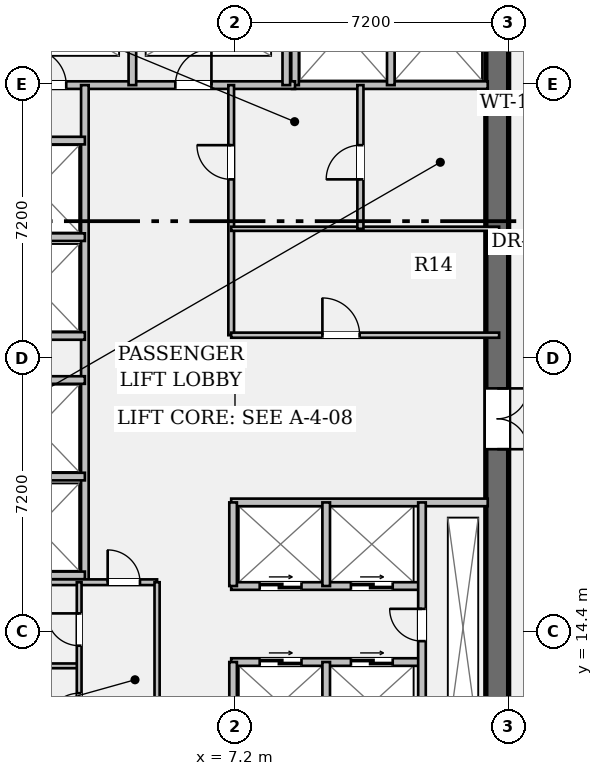
"""IFC4 building model, lengths in metres.
Left out: names, types, materials, properties, quantities, classifications, styles, units other than length and angle.
Written with IfcOpenShell. Run it as: python <this file> out.ifc"""

import sys

from ifc_helpers import new_model, si_unit, direction, frame, frame_2d, origin, place, context, subcontext, project, spatial, rectangle, extrude, element, fill, save


model = new_model("IFC4")
c1 = context("Model", 3, precision=1e-05, world=origin(), true_north=direction((0.0, 1.0)))
c2 = subcontext(c1, "Body", "Model", "MODEL_VIEW")
j1 = project(units=[si_unit("LENGTHUNIT", "METRE"), si_unit("PLANEANGLEUNIT", "RADIAN")], contexts=[c1])
p1 = place(None, origin())
s1 = spatial("IfcSite", under=j1, at=p1, CompositionType="ELEMENT")
p2 = place(p1, origin())
s2 = spatial("IfcBuilding", under=s1, at=p2, CompositionType="ELEMENT")
p3 = place(p2, frame((0.0, 0.0, 129.15)))
s3 = spatial("IfcBuildingStorey", under=s2, at=p3, CompositionType="ELEMENT", Elevation=129.15)
p4 = place(p3, frame((14.1, 35.4, 0.0), z_axis=(0.0, 0.0, 1.0), x_axis=(0.0, -1.0, 0.0)))
e1 = element("IfcWall", 1, at=p4, inside=s3, PredefinedType="SHEAR", context=c2, shape_type="SweptSolid", body=[
    extrude(rectangle(XDim=27.6, YDim=0.6, at=frame_2d((13.8, 0.0))), origin(), (0.0, 0.0, 1.0), 3.58),
])
p5 = place(p4, frame((1.3, 0.0, 0.0)))
e2 = element("IfcOpeningElement", 2, at=p5, cuts=e1, PredefinedType="OPENING", context=c2, shape_type="SweptSolid", body=[
    extrude(rectangle(XDim=1.2, YDim=2.15, at=frame_2d((0.6, 1.075))), frame((0.0, 0.312, 0.0), z_axis=(0.0, -1.0, 0.0), x_axis=(1.0, 0.0, 0.0)), (0.0, 0.0, 1.0), 0.624),
])
p6 = place(p4, frame((25.25, 0.0, 0.0)))
e3 = element("IfcOpeningElement", 3, at=p6, cuts=e1, PredefinedType="OPENING", context=c2, shape_type="SweptSolid", body=[
    extrude(rectangle(XDim=1.2, YDim=2.15, at=frame_2d((0.6, 1.075))), frame((0.0, 0.312, 0.0), z_axis=(0.0, -1.0, 0.0), x_axis=(1.0, 0.0, 0.0)), (0.0, 0.0, 1.0), 0.624),
])
p7 = place(p4, frame((14.6, 0.0, 0.0)))
e4 = element("IfcOpeningElement", 4, at=p7, cuts=e1, PredefinedType="OPENING", context=c2, shape_type="SweptSolid", body=[
    extrude(rectangle(XDim=1.6, YDim=2.2, at=frame_2d((0.8, 1.1))), frame((0.0, 0.312, 0.0), z_axis=(0.0, -1.0, 0.0), x_axis=(1.0, 0.0, 0.0)), (0.0, 0.0, 1.0), 0.624),
])
p8 = place(p3, frame((8.7, 28.78, 0.0), z_axis=(0.0, 0.0, 1.0), x_axis=(1.0, 0.0, 0.0)))
e5 = element("IfcWall", 5, at=p8, inside=s3, PredefinedType="PARTITIONING", context=c2, shape_type="SweptSolid", body=[
    extrude(rectangle(XDim=5.15, YDim=0.2, at=frame_2d((2.575, 0.0))), origin(), (0.0, 0.0, 1.0), 3.58),
])
for number, where, z_axis, x_axis in (
    (6, (8.78, 28.78, 0.0), (0.0, 0.0, 1.0), (0.0, 1.0, 0.0)),
    (7, (11.3, 28.78, 0.0), (0.0, 0.0, 1.0), (0.0, 1.0, 0.0)),
):
    element("IfcWall", number, at=place(p3, frame(where, z_axis=z_axis, x_axis=x_axis)), inside=s3, PredefinedType="PARTITIONING", context=c2, shape_type="SweptSolid", body=[
        extrude(rectangle(XDim=3.1, YDim=0.2, at=frame_2d((1.55, 0.0))), origin(), (0.0, 0.0, 1.0), 3.58),
    ])
p9 = place(p3, frame((0.6, 28.78, 0.0), z_axis=(0.0, 0.0, 1.0), x_axis=(1.0, 0.0, 0.0)))
e8 = element("IfcWall", 8, at=p9, inside=s3, PredefinedType="PARTITIONING", context=c2, shape_type="SweptSolid", body=[
    extrude(rectangle(XDim=8.18, YDim=0.2, at=frame_2d((4.09, 0.0))), origin(), (0.0, 0.0, 1.0), 3.58),
])
p10 = place(p9, frame((1.21, 0.0, 0.0)))
e9 = element("IfcOpeningElement", 9, at=p10, cuts=e8, PredefinedType="OPENING", context=c2, shape_type="SweptSolid", body=[
    extrude(rectangle(XDim=0.95, YDim=2.15, at=frame_2d((0.475, 1.075))), frame((0.0, 0.112, 0.0), z_axis=(0.0, -1.0, 0.0), x_axis=(1.0, 0.0, 0.0)), (0.0, 0.0, 1.0), 0.224),
])
p11 = place(p9, frame((5.03, 0.0, 0.0)))
e10 = element("IfcOpeningElement", 10, at=p11, cuts=e8, PredefinedType="OPENING", context=c2, shape_type="SweptSolid", body=[
    extrude(rectangle(XDim=0.95, YDim=2.15, at=frame_2d((0.475, 1.075))), frame((0.0, 0.112, 0.0), z_axis=(0.0, -1.0, 0.0), x_axis=(1.0, 0.0, 0.0)), (0.0, 0.0, 1.0), 0.224),
])
for number, where, z_axis, x_axis in (
    (11, (4.5, 28.78, 0.0), (0.0, 0.0, 1.0), (0.0, 1.0, 0.0)),
    (12, (8.55, 28.78, 0.0), (0.0, 0.0, 1.0), (0.0, 1.0, 0.0)),
):
    element("IfcWall", number, at=place(p3, frame(where, z_axis=z_axis, x_axis=x_axis)), inside=s3, PredefinedType="PARTITIONING", context=c2, shape_type="SweptSolid", body=[
        extrude(rectangle(XDim=2.94, YDim=0.2, at=frame_2d((1.47, 0.0))), origin(), (0.0, 0.0, 1.0), 3.58),
    ])
p12 = place(p3, frame((3.25, 15.7, 0.0), z_axis=(0.0, 0.0, 1.0), x_axis=(0.0, 1.0, 0.0)))
e13 = element("IfcWall", 13, at=p12, inside=s3, PredefinedType="PARTITIONING", context=c2, shape_type="SweptSolid", body=[
    extrude(rectangle(XDim=13.08, YDim=0.2, at=frame_2d((6.54, 0.0))), origin(), (0.0, 0.0, 1.0), 3.58),
])
for number, where, z_axis, x_axis in (
    (14, (0.6, 15.88, 0.0), (0.0, 0.0, 1.0), (1.0, 0.0, 0.0)),
    (15, (0.6, 18.48, 0.0), (0.0, 0.0, 1.0), (1.0, 0.0, 0.0)),
    (16, (0.6, 22.18, 0.0), (0.0, 0.0, 1.0), (1.0, 0.0, 0.0)),
    (17, (0.6, 24.78, 0.0), (0.0, 0.0, 1.0), (1.0, 0.0, 0.0)),
    (18, (0.6, 21.02, 0.0), (0.0, 0.0, 1.0), (1.0, 0.0, 0.0)),
    (19, (0.6, 27.32, 0.0), (0.0, 0.0, 1.0), (1.0, 0.0, 0.0)),
):
    element("IfcWall", number, at=place(p3, frame(where, z_axis=z_axis, x_axis=x_axis)), inside=s3, PredefinedType="PARTITIONING", context=c2, shape_type="SweptSolid", body=[
        extrude(rectangle(XDim=2.65, YDim=0.2, at=frame_2d((1.325, 0.0))), origin(), (0.0, 0.0, 1.0), 3.58),
    ])
p13 = place(p3, frame((7.1, 22.2, 0.0), z_axis=(0.0, 0.0, 1.0), x_axis=(0.0, 1.0, 0.0)))
e20 = element("IfcWall", 20, at=p13, inside=s3, PredefinedType="PARTITIONING", context=c2, shape_type="SweptSolid", body=[
    extrude(rectangle(XDim=6.58, YDim=0.15, at=frame_2d((3.29, 0.0))), origin(), (0.0, 0.0, 1.0), 3.58),
])
p14 = place(p13, frame((4.1, 0.0, 0.0)))
e21 = element("IfcOpeningElement", 21, at=p14, cuts=e20, PredefinedType="OPENING", context=c2, shape_type="SweptSolid", body=[
    extrude(rectangle(XDim=0.9, YDim=2.15, at=frame_2d((0.45, 1.075))), frame((0.0, 0.087, 0.0), z_axis=(0.0, -1.0, 0.0), x_axis=(1.0, 0.0, 0.0)), (0.0, 0.0, 1.0), 0.174),
])
p15 = place(p3, frame((7.1, 22.2, 0.0), z_axis=(0.0, 0.0, 1.0), x_axis=(1.0, 0.0, 0.0)))
e22 = element("IfcWall", 22, at=p15, inside=s3, PredefinedType="PARTITIONING", context=c2, shape_type="SweptSolid", body=[
    extrude(rectangle(XDim=7.05, YDim=0.135, at=frame_2d((3.525, 0.0))), origin(), (0.0, 0.0, 1.0), 3.58),
])
p16 = place(p15, frame((2.4, 0.0, 0.0)))
e23 = element("IfcOpeningElement", 23, at=p16, cuts=e22, PredefinedType="OPENING", context=c2, shape_type="SweptSolid", body=[
    extrude(rectangle(XDim=0.98, YDim=2.15, at=frame_2d((0.49, 1.075))), frame((0.0, 0.08, 0.0), z_axis=(0.0, -1.0, 0.0), x_axis=(1.0, 0.0, 0.0)), (0.0, 0.0, 1.0), 0.159),
])
p17 = place(p3, frame((7.1, 25.0, 0.0), z_axis=(0.0, 0.0, 1.0), x_axis=(1.0, 0.0, 0.0)))
e24 = element("IfcWall", 24, at=p17, inside=s3, PredefinedType="PARTITIONING", context=c2, shape_type="SweptSolid", body=[
    extrude(rectangle(XDim=7.05, YDim=0.11, at=frame_2d((3.525, 0.0))), origin(), (0.0, 0.0, 1.0), 3.58),
])
p18 = place(p3, frame((10.5, 25.0, 0.0), z_axis=(0.0, 0.0, 1.0), x_axis=(0.0, 1.0, 0.0)))
e25 = element("IfcWall", 25, at=p18, inside=s3, PredefinedType="PARTITIONING", context=c2, shape_type="SweptSolid", body=[
    extrude(rectangle(XDim=3.78, YDim=0.16, at=frame_2d((1.89, 0.0))), origin(), (0.0, 0.0, 1.0), 3.58),
])
p19 = place(p18, frame((1.3, 0.0, 0.0)))
e26 = element("IfcOpeningElement", 26, at=p19, cuts=e25, PredefinedType="OPENING", context=c2, shape_type="SweptSolid", body=[
    extrude(rectangle(XDim=0.9, YDim=2.15, at=frame_2d((0.45, 1.075))), frame((0.0, 0.092, 0.0), z_axis=(0.0, -1.0, 0.0), x_axis=(1.0, 0.0, 0.0)), (0.0, 0.0, 1.0), 0.184),
])
p20 = place(p3, frame((7.1, 17.8, 0.0), z_axis=(0.0, 0.0, 1.0), x_axis=(1.0, 0.0, 0.0)))
e27 = element("IfcWall", 27, at=p20, inside=s3, PredefinedType="PARTITIONING", context=c2, shape_type="SweptSolid", body=[
    extrude(rectangle(XDim=6.75, YDim=0.2, at=frame_2d((3.375, 0.0))), origin(), (0.0, 0.0, 1.0), 3.58),
])
p21 = place(p3, frame((7.1, 15.6, 0.0), z_axis=(0.0, 0.0, 1.0), x_axis=(1.0, 0.0, 0.0)))
e28 = element("IfcWall", 28, at=p21, inside=s3, PredefinedType="PARTITIONING", context=c2, shape_type="SweptSolid", body=[
    extrude(rectangle(XDim=5.02, YDim=0.2, at=frame_2d((2.51, 0.0))), origin(), (0.0, 0.0, 1.0), 3.58),
])
p22 = place(p21, frame((0.75, 0.0, 0.0)))
e29 = element("IfcOpeningElement", 29, at=p22, cuts=e28, PredefinedType="OPENING", context=c2, shape_type="SweptSolid", body=[
    extrude(rectangle(XDim=1.1, YDim=2.2, at=frame_2d((0.55, 1.1))), frame((0.0, 0.112, 0.0), z_axis=(0.0, -1.0, 0.0), x_axis=(1.0, 0.0, 0.0)), (0.0, 0.0, 1.0), 0.224),
])
p23 = place(p21, frame((3.15, 0.0, 0.0)))
e30 = element("IfcOpeningElement", 30, at=p23, cuts=e28, PredefinedType="OPENING", context=c2, shape_type="SweptSolid", body=[
    extrude(rectangle(XDim=1.1, YDim=2.2, at=frame_2d((0.55, 1.1))), frame((0.0, 0.112, 0.0), z_axis=(0.0, -1.0, 0.0), x_axis=(1.0, 0.0, 0.0)), (0.0, 0.0, 1.0), 0.224),
])
p24 = place(p3, frame((7.1, 13.6, 0.0), z_axis=(0.0, 0.0, 1.0), x_axis=(1.0, 0.0, 0.0)))
e31 = element("IfcWall", 31, at=p24, inside=s3, PredefinedType="PARTITIONING", context=c2, shape_type="SweptSolid", body=[
    extrude(rectangle(XDim=5.02, YDim=0.2, at=frame_2d((2.51, 0.0))), origin(), (0.0, 0.0, 1.0), 3.58),
])
p25 = place(p24, frame((0.75, 0.0, 0.0)))
e32 = element("IfcOpeningElement", 32, at=p25, cuts=e31, PredefinedType="OPENING", context=c2, shape_type="SweptSolid", body=[
    extrude(rectangle(XDim=1.1, YDim=2.2, at=frame_2d((0.55, 1.1))), frame((0.0, 0.112, 0.0), z_axis=(0.0, -1.0, 0.0), x_axis=(1.0, 0.0, 0.0)), (0.0, 0.0, 1.0), 0.224),
])
p26 = place(p24, frame((3.15, 0.0, 0.0)))
e33 = element("IfcOpeningElement", 33, at=p26, cuts=e31, PredefinedType="OPENING", context=c2, shape_type="SweptSolid", body=[
    extrude(rectangle(XDim=1.1, YDim=2.2, at=frame_2d((0.55, 1.1))), frame((0.0, 0.112, 0.0), z_axis=(0.0, -1.0, 0.0), x_axis=(1.0, 0.0, 0.0)), (0.0, 0.0, 1.0), 0.224),
])
p27 = place(p3, frame((7.15, 15.6, 0.0), z_axis=(0.0, 0.0, 1.0), x_axis=(0.0, 1.0, 0.0)))
e34 = element("IfcWall", 34, at=p27, inside=s3, PredefinedType="PARTITIONING", context=c2, shape_type="SweptSolid", body=[
    extrude(rectangle(XDim=2.2, YDim=0.2, at=frame_2d((1.1, 0.0))), origin(), (0.0, 0.0, 1.0), 3.58),
])
p28 = place(p3, frame((7.15, 11.2, 0.0), z_axis=(0.0, 0.0, 1.0), x_axis=(0.0, 1.0, 0.0)))
e35 = element("IfcWall", 35, at=p28, inside=s3, PredefinedType="PARTITIONING", context=c2, shape_type="SweptSolid", body=[
    extrude(rectangle(XDim=2.4, YDim=0.2, at=frame_2d((1.2, 0.0))), origin(), (0.0, 0.0, 1.0), 3.58),
])
p29 = place(p3, frame((9.6, 15.6, 0.0), z_axis=(0.0, 0.0, 1.0), x_axis=(0.0, 1.0, 0.0)))
e36 = element("IfcWall", 36, at=p29, inside=s3, PredefinedType="PARTITIONING", context=c2, shape_type="SweptSolid", body=[
    extrude(rectangle(XDim=2.2, YDim=0.2, at=frame_2d((1.1, 0.0))), origin(), (0.0, 0.0, 1.0), 3.58),
])
p30 = place(p3, frame((9.6, 11.2, 0.0), z_axis=(0.0, 0.0, 1.0), x_axis=(0.0, 1.0, 0.0)))
e37 = element("IfcWall", 37, at=p30, inside=s3, PredefinedType="PARTITIONING", context=c2, shape_type="SweptSolid", body=[
    extrude(rectangle(XDim=2.4, YDim=0.2, at=frame_2d((1.2, 0.0))), origin(), (0.0, 0.0, 1.0), 3.58),
])
p31 = place(p3, frame((12.12, 11.2, 0.0), z_axis=(0.0, 0.0, 1.0), x_axis=(0.0, 1.0, 0.0)))
e38 = element("IfcWall", 38, at=p31, inside=s3, PredefinedType="PARTITIONING", context=c2, shape_type="SweptSolid", body=[
    extrude(rectangle(XDim=6.6, YDim=0.2, at=frame_2d((3.3, 0.0))), origin(), (0.0, 0.0, 1.0), 3.58),
])
p32 = place(p31, frame((2.95, 0.0, 0.0)))
e39 = element("IfcOpeningElement", 39, at=p32, cuts=e38, PredefinedType="OPENING", context=c2, shape_type="SweptSolid", body=[
    extrude(rectangle(XDim=0.85, YDim=2.15, at=frame_2d((0.425, 1.075))), frame((0.0, 0.112, 0.0), z_axis=(0.0, -1.0, 0.0), x_axis=(1.0, 0.0, 0.0)), (0.0, 0.0, 1.0), 0.224),
])
p33 = place(p3, frame((0.6, 15.7, 0.0), z_axis=(0.0, 0.0, 1.0), x_axis=(1.0, 0.0, 0.0)))
e40 = element("IfcWall", 40, at=p33, inside=s3, PredefinedType="PARTITIONING", context=c2, shape_type="SweptSolid", body=[
    extrude(rectangle(XDim=4.55, YDim=0.15, at=frame_2d((2.275, 0.0))), origin(), (0.0, 0.0, 1.0), 3.58),
])
p34 = place(p33, frame((3.25, 0.0, 0.0)))
e41 = element("IfcOpeningElement", 41, at=p34, cuts=e40, PredefinedType="OPENING", context=c2, shape_type="SweptSolid", body=[
    extrude(rectangle(XDim=0.85, YDim=2.15, at=frame_2d((0.425, 1.075))), frame((0.0, 0.087, 0.0), z_axis=(0.0, -1.0, 0.0), x_axis=(1.0, 0.0, 0.0)), (0.0, 0.0, 1.0), 0.174),
])
p35 = place(p3, frame((5.15, 11.28, 0.0), z_axis=(0.0, 0.0, 1.0), x_axis=(0.0, 1.0, 0.0)))
e42 = element("IfcWall", 42, at=p35, inside=s3, PredefinedType="PARTITIONING", context=c2, shape_type="SweptSolid", body=[
    extrude(rectangle(XDim=4.42, YDim=0.135, at=frame_2d((2.21, 0.0))), origin(), (0.0, 0.0, 1.0), 3.58),
])
p36 = place(p3, frame((0.6, 13.5, 0.0), z_axis=(0.0, 0.0, 1.0), x_axis=(1.0, 0.0, 0.0)))
e43 = element("IfcWall", 43, at=p36, inside=s3, PredefinedType="PARTITIONING", context=c2, shape_type="SweptSolid", body=[
    extrude(rectangle(XDim=2.5, YDim=0.125, at=frame_2d((1.25, 0.0))), origin(), (0.0, 0.0, 1.0), 3.58),
])
p37 = place(p3, frame((3.1, 11.28, 0.0), z_axis=(0.0, 0.0, 1.0), x_axis=(0.0, 1.0, 0.0)))
e44 = element("IfcWall", 44, at=p37, inside=s3, PredefinedType="PARTITIONING", context=c2, shape_type="SweptSolid", body=[
    extrude(rectangle(XDim=4.42, YDim=0.125, at=frame_2d((2.21, 0.0))), origin(), (0.0, 0.0, 1.0), 3.58),
])
p38 = place(p37, frame((0.65, 0.0, 0.0)))
e45 = element("IfcOpeningElement", 45, at=p38, cuts=e44, PredefinedType="OPENING", context=c2, shape_type="SweptSolid", body=[
    extrude(rectangle(XDim=0.85, YDim=2.15, at=frame_2d((0.425, 1.075))), frame((0.0, 0.074, 0.0), z_axis=(0.0, -1.0, 0.0), x_axis=(1.0, 0.0, 0.0)), (0.0, 0.0, 1.0), 0.149),
])
p39 = place(p37, frame((2.75, 0.0, 0.0)))
e46 = element("IfcOpeningElement", 46, at=p39, cuts=e44, PredefinedType="OPENING", context=c2, shape_type="SweptSolid", body=[
    extrude(rectangle(XDim=0.85, YDim=2.15, at=frame_2d((0.425, 1.075))), frame((0.0, 0.074, 0.0), z_axis=(0.0, -1.0, 0.0), x_axis=(1.0, 0.0, 0.0)), (0.0, 0.0, 1.0), 0.149),
])
p40 = place(p10, origin())
e47 = element("IfcDoor", 47, at=p40, inside=s3, OperationType="SINGLE_SWING_LEFT", PredefinedType="DOOR", context=c2, shape_type="SweptSolid", body=[
    extrude(rectangle(XDim=0.95, YDim=2.15, at=frame_2d((0.475, 1.075))), frame((0.0, 0.025, 0.0), z_axis=(0.0, -1.0, 0.0), x_axis=(1.0, 0.0, 0.0)), (0.0, 0.0, 1.0), 0.05),
])
fill(e9, e47)
p41 = place(p11, origin())
e48 = element("IfcDoor", 48, at=p41, inside=s3, OperationType="SINGLE_SWING_RIGHT", PredefinedType="DOOR", context=c2, shape_type="SweptSolid", body=[
    extrude(rectangle(XDim=0.95, YDim=2.15, at=frame_2d((0.475, 1.075))), frame((0.0, 0.025, 0.0), z_axis=(0.0, -1.0, 0.0), x_axis=(1.0, 0.0, 0.0)), (0.0, 0.0, 1.0), 0.05),
])
fill(e10, e48)
p42 = place(p7, origin())
e49 = element("IfcDoor", 49, at=p42, inside=s3, OperationType="DOUBLE_DOOR_SINGLE_SWING", PredefinedType="DOOR", context=c2, shape_type="SweptSolid", body=[
    extrude(rectangle(XDim=1.6, YDim=2.2, at=frame_2d((0.8, 1.1))), frame((0.0, 0.025, 0.0), z_axis=(0.0, -1.0, 0.0), x_axis=(1.0, 0.0, 0.0)), (0.0, 0.0, 1.0), 0.05),
])
fill(e4, e49)
p43 = place(p16, origin())
e50 = element("IfcDoor", 50, at=p43, inside=s3, OperationType="SINGLE_SWING_LEFT", PredefinedType="DOOR", context=c2, shape_type="SweptSolid", body=[
    extrude(rectangle(XDim=0.98, YDim=2.15, at=frame_2d((0.49, 1.075))), frame((0.0, 0.025, 0.0), z_axis=(0.0, -1.0, 0.0), x_axis=(1.0, 0.0, 0.0)), (0.0, 0.0, 1.0), 0.05),
])
fill(e23, e50)
p44 = place(p14, origin())
e51 = element("IfcDoor", 51, at=p44, inside=s3, OperationType="SINGLE_SWING_RIGHT", PredefinedType="DOOR", context=c2, shape_type="SweptSolid", body=[
    extrude(rectangle(XDim=0.9, YDim=2.15, at=frame_2d((0.45, 1.075))), frame((0.0, 0.025, 0.0), z_axis=(0.0, -1.0, 0.0), x_axis=(1.0, 0.0, 0.0)), (0.0, 0.0, 1.0), 0.05),
])
fill(e21, e51)
p45 = place(p19, origin())
e52 = element("IfcDoor", 52, at=p45, inside=s3, OperationType="SINGLE_SWING_LEFT", PredefinedType="DOOR", context=c2, shape_type="SweptSolid", body=[
    extrude(rectangle(XDim=0.9, YDim=2.15, at=frame_2d((0.45, 1.075))), frame((0.0, 0.025, 0.0), z_axis=(0.0, -1.0, 0.0), x_axis=(1.0, 0.0, 0.0)), (0.0, 0.0, 1.0), 0.05),
])
fill(e26, e52)
p46 = place(p32, origin())
e53 = element("IfcDoor", 53, at=p46, inside=s3, OperationType="SINGLE_SWING_RIGHT", PredefinedType="DOOR", context=c2, shape_type="SweptSolid", body=[
    extrude(rectangle(XDim=0.85, YDim=2.15, at=frame_2d((0.425, 1.075))), frame((0.0, 0.025, 0.0), z_axis=(0.0, -1.0, 0.0), x_axis=(1.0, 0.0, 0.0)), (0.0, 0.0, 1.0), 0.05),
])
fill(e39, e53)
p47 = place(p22, origin())
e54 = element("IfcDoor", 54, at=p47, inside=s3, OperationType="DOUBLE_DOOR_SLIDING", PredefinedType="DOOR", context=c2, shape_type="SweptSolid", body=[
    extrude(rectangle(XDim=1.1, YDim=2.2, at=frame_2d((0.55, 1.1))), frame((0.0, 0.025, 0.0), z_axis=(0.0, -1.0, 0.0), x_axis=(1.0, 0.0, 0.0)), (0.0, 0.0, 1.0), 0.05),
])
fill(e29, e54)
p48 = place(p23, origin())
e55 = element("IfcDoor", 55, at=p48, inside=s3, OperationType="DOUBLE_DOOR_SLIDING", PredefinedType="DOOR", context=c2, shape_type="SweptSolid", body=[
    extrude(rectangle(XDim=1.1, YDim=2.2, at=frame_2d((0.55, 1.1))), frame((0.0, 0.025, 0.0), z_axis=(0.0, -1.0, 0.0), x_axis=(1.0, 0.0, 0.0)), (0.0, 0.0, 1.0), 0.05),
])
fill(e30, e55)
p49 = place(p25, origin())
e56 = element("IfcDoor", 56, at=p49, inside=s3, OperationType="DOUBLE_DOOR_SLIDING", PredefinedType="DOOR", context=c2, shape_type="SweptSolid", body=[
    extrude(rectangle(XDim=1.1, YDim=2.2, at=frame_2d((0.55, 1.1))), frame((0.0, 0.025, 0.0), z_axis=(0.0, -1.0, 0.0), x_axis=(1.0, 0.0, 0.0)), (0.0, 0.0, 1.0), 0.05),
])
fill(e32, e56)
p50 = place(p26, origin())
e57 = element("IfcDoor", 57, at=p50, inside=s3, OperationType="DOUBLE_DOOR_SLIDING", PredefinedType="DOOR", context=c2, shape_type="SweptSolid", body=[
    extrude(rectangle(XDim=1.1, YDim=2.2, at=frame_2d((0.55, 1.1))), frame((0.0, 0.025, 0.0), z_axis=(0.0, -1.0, 0.0), x_axis=(1.0, 0.0, 0.0)), (0.0, 0.0, 1.0), 0.05),
])
fill(e33, e57)
p51 = place(p34, origin())
e58 = element("IfcDoor", 58, at=p51, inside=s3, OperationType="SINGLE_SWING_LEFT", PredefinedType="DOOR", context=c2, shape_type="SweptSolid", body=[
    extrude(rectangle(XDim=0.85, YDim=2.15, at=frame_2d((0.425, 1.075))), frame((0.0, 0.025, 0.0), z_axis=(0.0, -1.0, 0.0), x_axis=(1.0, 0.0, 0.0)), (0.0, 0.0, 1.0), 0.05),
])
fill(e41, e58)
p52 = place(p38, origin())
e59 = element("IfcDoor", 59, at=p52, inside=s3, OperationType="SINGLE_SWING_LEFT", PredefinedType="DOOR", context=c2, shape_type="SweptSolid", body=[
    extrude(rectangle(XDim=0.85, YDim=2.15, at=frame_2d((0.425, 1.075))), frame((0.0, 0.025, 0.0), z_axis=(0.0, -1.0, 0.0), x_axis=(1.0, 0.0, 0.0)), (0.0, 0.0, 1.0), 0.05),
])
fill(e45, e59)
p53 = place(p39, origin())
e60 = element("IfcDoor", 60, at=p53, inside=s3, OperationType="SINGLE_SWING_RIGHT", PredefinedType="DOOR", context=c2, shape_type="SweptSolid", body=[
    extrude(rectangle(XDim=0.85, YDim=2.15, at=frame_2d((0.425, 1.075))), frame((0.0, 0.025, 0.0), z_axis=(0.0, -1.0, 0.0), x_axis=(1.0, 0.0, 0.0)), (0.0, 0.0, 1.0), 0.05),
])
fill(e46, e60)
save(model, sys.argv[1])
